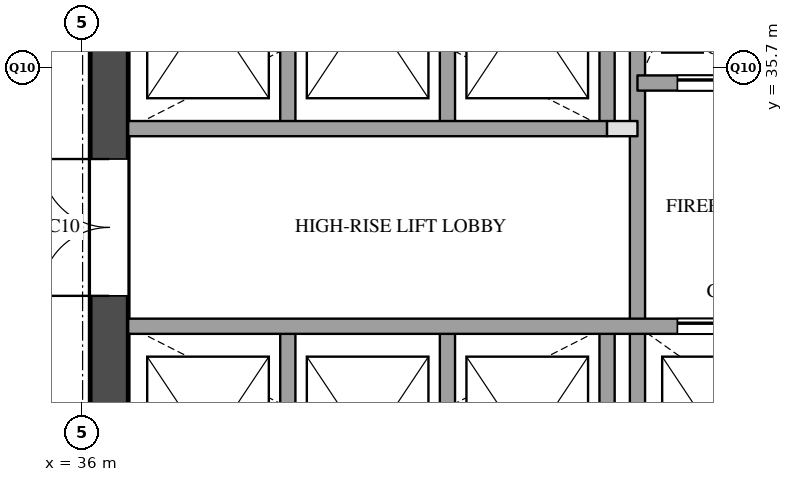
"""IFC4 building model, lengths in metres.
Left out: names, types, materials, properties, quantities, classifications, styles, units other than length and angle.
Written with IfcOpenShell. Run it as: python <this file> out.ifc"""

import sys

from ifc_helpers import new_model, si_unit, direction, frame, frame_2d, origin, place, context, subcontext, project, spatial, rectangle, extrude, element, fill, save


model = new_model("IFC4")
c1 = context("Model", 3, precision=1e-05, world=origin(), true_north=direction((0.0, 1.0)))
c2 = subcontext(c1, "Body", "Model", "MODEL_VIEW")
j1 = project(units=[si_unit("LENGTHUNIT", "METRE"), si_unit("PLANEANGLEUNIT", "RADIAN")], contexts=[c1])
p1 = place(None, origin())
s1 = spatial("IfcSite", under=j1, at=p1, CompositionType="ELEMENT")
p2 = place(p1, origin())
s2 = spatial("IfcBuilding", under=s1, at=p2, CompositionType="ELEMENT")
p3 = place(p2, frame((0.0, 0.0, 189.5)))
s3 = spatial("IfcBuildingStorey", under=s2, at=p3, CompositionType="ELEMENT", Elevation=189.5)
p4 = place(p3, frame((36.35, 29.1, 0.0), z_axis=(0.0, 0.0, 1.0), x_axis=(0.0, 1.0, 0.0)))
e1 = element("IfcWall", 1, at=p4, inside=s3, PredefinedType="SHEAR", context=c2, shape_type="SweptSolid", body=[
    extrude(rectangle(XDim=20.3, YDim=0.5, at=frame_2d((10.15, 0.0))), origin(), (0.0, 0.0, 1.0), 3.6),
])
p5 = place(p4, frame((3.6, 0.0, 0.0)))
e2 = element("IfcOpeningElement", 2, at=p5, cuts=e1, PredefinedType="OPENING", context=c2, shape_type="SweptSolid", body=[
    extrude(rectangle(XDim=1.8, YDim=2.1, at=frame_2d((0.9, 1.05))), frame((0.0, 0.26, 0.0), z_axis=(0.0, -1.0, 0.0), x_axis=(1.0, 0.0, 0.0)), (0.0, 0.0, 1.0), 0.52),
])
p6 = place(p4, frame((16.4, 0.0, 0.0)))
e3 = element("IfcOpeningElement", 3, at=p6, cuts=e1, PredefinedType="OPENING", context=c2, shape_type="SweptSolid", body=[
    extrude(rectangle(XDim=1.0, YDim=2.1, at=frame_2d((0.5, 1.05))), frame((0.0, 0.26, 0.0), z_axis=(0.0, -1.0, 0.0), x_axis=(1.0, 0.0, 0.0)), (0.0, 0.0, 1.0), 0.52),
])
p7 = place(p3, frame((38.7, 29.1, 0.0), z_axis=(0.0, 0.0, 1.0), x_axis=(0.0, 1.0, 0.0)))
e4 = element("IfcWall", 4, at=p7, inside=s3, PredefinedType="SOLIDWALL", context=c2, shape_type="SweptSolid", body=[
    extrude(rectangle(XDim=3.2, YDim=0.2, at=frame_2d((1.6, 0.0))), origin(), (0.0, 0.0, 1.0), 3.6),
])
p8 = place(p3, frame((38.7, 34.9, 0.0), z_axis=(0.0, 0.0, 1.0), x_axis=(0.0, 1.0, 0.0)))
e5 = element("IfcWall", 5, at=p8, inside=s3, PredefinedType="SOLIDWALL", context=c2, shape_type="SweptSolid", body=[
    extrude(rectangle(XDim=3.2, YDim=0.2, at=frame_2d((1.6, 0.0))), origin(), (0.0, 0.0, 1.0), 3.6),
])
p9 = place(p3, frame((40.8, 29.1, 0.0), z_axis=(0.0, 0.0, 1.0), x_axis=(0.0, 1.0, 0.0)))
e6 = element("IfcWall", 6, at=p9, inside=s3, PredefinedType="SOLIDWALL", context=c2, shape_type="SweptSolid", body=[
    extrude(rectangle(XDim=3.2, YDim=0.2, at=frame_2d((1.6, 0.0))), origin(), (0.0, 0.0, 1.0), 3.6),
])
p10 = place(p3, frame((40.8, 34.9, 0.0), z_axis=(0.0, 0.0, 1.0), x_axis=(0.0, 1.0, 0.0)))
e7 = element("IfcWall", 7, at=p10, inside=s3, PredefinedType="SOLIDWALL", context=c2, shape_type="SweptSolid", body=[
    extrude(rectangle(XDim=3.2, YDim=0.2, at=frame_2d((1.6, 0.0))), origin(), (0.0, 0.0, 1.0), 3.6),
])
p11 = place(p3, frame((42.9, 29.1, 0.0), z_axis=(0.0, 0.0, 1.0), x_axis=(0.0, 1.0, 0.0)))
e8 = element("IfcWall", 8, at=p11, inside=s3, PredefinedType="SOLIDWALL", context=c2, shape_type="SweptSolid", body=[
    extrude(rectangle(XDim=3.2, YDim=0.2, at=frame_2d((1.6, 0.0))), origin(), (0.0, 0.0, 1.0), 3.6),
])
p12 = place(p3, frame((42.9, 34.9, 0.0), z_axis=(0.0, 0.0, 1.0), x_axis=(0.0, 1.0, 0.0)))
e9 = element("IfcWall", 9, at=p12, inside=s3, PredefinedType="SOLIDWALL", context=c2, shape_type="SweptSolid", body=[
    extrude(rectangle(XDim=3.2, YDim=0.2, at=frame_2d((1.6, 0.0))), origin(), (0.0, 0.0, 1.0), 3.6),
])
p13 = place(p3, frame((43.3, 29.1, 0.0), z_axis=(0.0, 0.0, 1.0), x_axis=(0.0, 1.0, 0.0)))
e10 = element("IfcWall", 10, at=p13, inside=s3, PredefinedType="SOLIDWALL", context=c2, shape_type="SweptSolid", body=[
    extrude(rectangle(XDim=9.9, YDim=0.2, at=frame_2d((4.95, 0.0))), origin(), (0.0, 0.0, 1.0), 3.6),
])
p14 = place(p3, frame((36.6, 32.3, 0.0), z_axis=(0.0, 0.0, 1.0), x_axis=(1.0, 0.0, 0.0)))
e11 = element("IfcWall", 11, at=p14, inside=s3, PredefinedType="SOLIDWALL", context=c2, shape_type="SweptSolid", body=[
    extrude(rectangle(XDim=11.2, YDim=0.2, at=frame_2d((5.6, 0.0))), origin(), (0.0, 0.0, 1.0), 3.6),
])
p15 = place(p14, frame((7.225, 0.0, 0.0)))
e12 = element("IfcOpeningElement", 12, at=p15, cuts=e11, PredefinedType="OPENING", context=c2, shape_type="SweptSolid", body=[
    extrude(rectangle(XDim=1.2, YDim=2.1, at=frame_2d((0.6, 1.05))), frame((0.0, 0.11, 0.0), z_axis=(0.0, -1.0, 0.0), x_axis=(1.0, 0.0, 0.0)), (0.0, 0.0, 1.0), 0.22),
])
p16 = place(p14, frame((9.475, 0.0, 0.0)))
e13 = element("IfcOpeningElement", 13, at=p16, cuts=e11, PredefinedType="OPENING", context=c2, shape_type="SweptSolid", body=[
    extrude(rectangle(XDim=1.2, YDim=2.1, at=frame_2d((0.6, 1.05))), frame((0.0, 0.11, 0.0), z_axis=(0.0, -1.0, 0.0), x_axis=(1.0, 0.0, 0.0)), (0.0, 0.0, 1.0), 0.22),
])
p17 = place(p3, frame((42.9, 34.9, 0.0), z_axis=(0.0, 0.0, 1.0), x_axis=(1.0, 0.0, 0.0)))
e14 = element("IfcWall", 14, at=p17, inside=s3, PredefinedType="PARTITIONING", context=c2, shape_type="SweptSolid", body=[
    extrude(rectangle(XDim=0.4, YDim=0.2, at=frame_2d((0.2, 0.0))), origin(), (0.0, 0.0, 1.0), 3.6),
])
p18 = place(p3, frame((36.6, 34.9, 0.0), z_axis=(0.0, 0.0, 1.0), x_axis=(1.0, 0.0, 0.0)))
e15 = element("IfcWall", 15, at=p18, inside=s3, PredefinedType="SOLIDWALL", context=c2, shape_type="SweptSolid", body=[
    extrude(rectangle(XDim=6.3, YDim=0.2, at=frame_2d((3.15, 0.0))), origin(), (0.0, 0.0, 1.0), 3.6),
])
p19 = place(p3, frame((43.3, 35.5, 0.0), z_axis=(0.0, 0.0, 1.0), x_axis=(1.0, 0.0, 0.0)))
e16 = element("IfcWall", 16, at=p19, inside=s3, PredefinedType="SOLIDWALL", context=c2, shape_type="SweptSolid", body=[
    extrude(rectangle(XDim=4.5, YDim=0.2, at=frame_2d((2.25, 0.0))), origin(), (0.0, 0.0, 1.0), 3.6),
])
p20 = place(p19, frame((0.525, 0.0, 0.0)))
e17 = element("IfcOpeningElement", 17, at=p20, cuts=e16, PredefinedType="OPENING", context=c2, shape_type="SweptSolid", body=[
    extrude(rectangle(XDim=1.2, YDim=2.1, at=frame_2d((0.6, 1.05))), frame((0.0, 0.11, 0.0), z_axis=(0.0, -1.0, 0.0), x_axis=(1.0, 0.0, 0.0)), (0.0, 0.0, 1.0), 0.22),
])
p21 = place(p19, frame((3.025, 0.0, 0.0)))
e18 = element("IfcOpeningElement", 18, at=p21, cuts=e16, PredefinedType="OPENING", context=c2, shape_type="SweptSolid", body=[
    extrude(rectangle(XDim=0.7, YDim=2.1, at=frame_2d((0.35, 1.05))), frame((0.0, 0.11, 0.0), z_axis=(0.0, -1.0, 0.0), x_axis=(1.0, 0.0, 0.0)), (0.0, 0.0, 1.0), 0.22),
])
p22 = place(p15, origin())
e19 = element("IfcDoor", 19, at=p22, inside=s3, OperationType="SLIDING_TO_LEFT", PredefinedType="DOOR", context=c2, shape_type="SweptSolid", body=[
    extrude(rectangle(XDim=1.2, YDim=2.1, at=frame_2d((0.6, 1.05))), frame((0.0, 0.025, 0.0), z_axis=(0.0, -1.0, 0.0), x_axis=(1.0, 0.0, 0.0)), (0.0, 0.0, 1.0), 0.05),
])
fill(e12, e19)
p23 = place(p20, origin())
e20 = element("IfcDoor", 20, at=p23, inside=s3, OperationType="SLIDING_TO_LEFT", PredefinedType="DOOR", context=c2, shape_type="SweptSolid", body=[
    extrude(rectangle(XDim=1.2, YDim=2.1, at=frame_2d((0.6, 1.05))), frame((0.0, 0.025, 0.0), z_axis=(0.0, -1.0, 0.0), x_axis=(1.0, 0.0, 0.0)), (0.0, 0.0, 1.0), 0.05),
])
fill(e17, e20)
p24 = place(p5, origin())
e21 = element("IfcDoor", 21, at=p24, inside=s3, OperationType="DOUBLE_DOOR_SINGLE_SWING", PredefinedType="DOOR", context=c2, shape_type="SweptSolid", body=[
    extrude(rectangle(XDim=1.8, YDim=2.1, at=frame_2d((0.9, 1.05))), frame((0.0, 0.025, 0.0), z_axis=(0.0, -1.0, 0.0), x_axis=(1.0, 0.0, 0.0)), (0.0, 0.0, 1.0), 0.05),
])
fill(e2, e21)
save(model, sys.argv[1])
